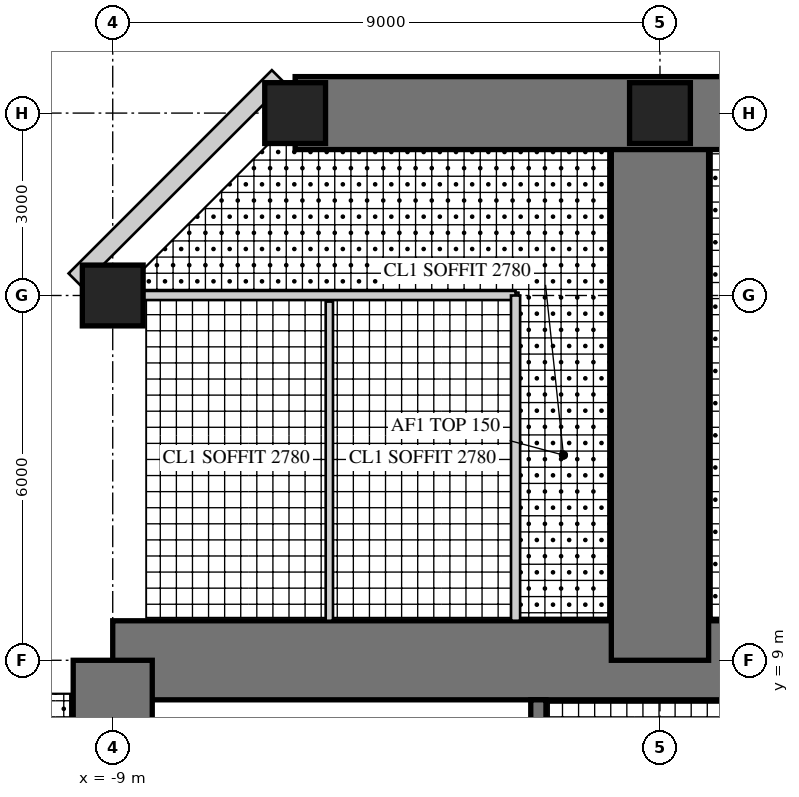
"""IFC4 building model, lengths in metres.
Left out: names, types, materials, properties, quantities, classifications, styles, units other than length and angle.
Written with IfcOpenShell. Run it as: python <this file> out.ifc"""

import sys

from ifc_helpers import new_model, si_unit, direction, frame, frame_2d, origin, origin_2d, place, context, subcontext, project, spatial, rectangle, hollow_rectangle, extrude, element, fill, save


model = new_model("IFC4")
c1 = context("Model", 3, precision=1e-05, world=origin(), true_north=direction((0.0, 1.0)))
c2 = subcontext(c1, "Body", "Model", "MODEL_VIEW")
j1 = project(units=[si_unit("LENGTHUNIT", "METRE"), si_unit("PLANEANGLEUNIT", "RADIAN")], contexts=[c1])
p1 = place(None, origin())
s1 = spatial("IfcSite", under=j1, at=p1, CompositionType="ELEMENT")
p2 = place(p1, origin())
s2 = spatial("IfcBuilding", under=s1, at=p2, CompositionType="ELEMENT")
p3 = place(p2, frame((0.0, 0.0, 116.5)))
s3 = spatial("IfcBuildingStorey", under=s2, at=p3, CompositionType="ELEMENT", Elevation=116.5)
p4 = place(p3, frame((9.0, 9.0, 0.0), z_axis=(0.0, 0.0, 1.0), x_axis=(-1.0, 0.0, 0.0)))
e1 = element("IfcWall", 1, at=p4, inside=s3, PredefinedType="SHEAR", context=c2, shape_type="SweptSolid", body=[
    extrude(rectangle(XDim=18.0, YDim=1.3, at=frame_2d((9.0, 0.0))), origin(), (0.0, 0.0, 1.0), 4.0),
])
p5 = place(p4, frame((9.8, 0.0, 0.0)))
e2 = element("IfcOpeningElement", 2, at=p5, cuts=e1, PredefinedType="OPENING", context=c2, shape_type="SweptSolid", body=[
    extrude(rectangle(XDim=1.0, YDim=2.4, at=frame_2d((0.5, 1.2))), frame((0.0, 0.66, 0.0), z_axis=(0.0, -1.0, 0.0), x_axis=(1.0, 0.0, 0.0)), (0.0, 0.0, 1.0), 1.32),
])
p6 = place(p3, frame((-9.0, 9.0, 0.0), z_axis=(0.0, 0.0, 1.0), x_axis=(0.0, -1.0, 0.0)))
e3 = element("IfcWall", 3, at=p6, inside=s3, PredefinedType="SHEAR", context=c2, shape_type="SweptSolid", body=[
    extrude(rectangle(XDim=18.0, YDim=1.3, at=frame_2d((9.0, 0.0))), origin(), (0.0, 0.0, 1.0), 4.0),
])
p7 = place(p6, frame((9.8, 0.0, 0.0)))
e4 = element("IfcOpeningElement", 4, at=p7, cuts=e3, PredefinedType="OPENING", context=c2, shape_type="SweptSolid", body=[
    extrude(rectangle(XDim=1.0, YDim=2.4, at=frame_2d((0.5, 1.2))), frame((0.0, 0.66, 0.0), z_axis=(0.0, -1.0, 0.0), x_axis=(1.0, 0.0, 0.0)), (0.0, 0.0, 1.0), 1.32),
])
p8 = place(p3, frame((-2.0, 1.675, 0.0), z_axis=(0.0, 0.0, 1.0), x_axis=(0.0, 1.0, 0.0)))
e5 = element("IfcWall", 5, at=p8, inside=s3, PredefinedType="SHEAR", context=c2, shape_type="SweptSolid", body=[
    extrude(rectangle(XDim=6.675, YDim=0.25, at=frame_2d((3.337, 0.0))), origin(), (0.0, 0.0, 1.0), 4.0),
])
p9 = place(p8, frame((0.725, 0.0, 0.0)))
e6 = element("IfcOpeningElement", 6, at=p9, cuts=e5, PredefinedType="OPENING", context=c2, shape_type="SweptSolid", body=[
    extrude(rectangle(XDim=1.0, YDim=2.1, at=frame_2d((0.5, 1.05))), frame((0.0, 0.135, 0.0), z_axis=(0.0, -1.0, 0.0), x_axis=(1.0, 0.0, 0.0)), (0.0, 0.0, 1.0), 0.27),
])
p10 = place(p3, frame((0.0, 9.0, 0.0), z_axis=(0.0, 0.0, 1.0), x_axis=(0.0, 1.0, 0.0)))
e7 = element("IfcWall", 7, at=p10, inside=s3, PredefinedType="SHEAR", context=c2, shape_type="SweptSolid", body=[
    extrude(rectangle(XDim=9.0, YDim=1.6, at=frame_2d((4.5, 0.0))), origin(), (0.0, 0.0, 1.0), 4.0),
])
p11 = place(p10, frame((4.3, 0.0, 0.0)))
e8 = element("IfcOpeningElement", 8, at=p11, cuts=e7, PredefinedType="OPENING", context=c2, shape_type="SweptSolid", body=[
    extrude(rectangle(XDim=1.0, YDim=2.2, at=frame_2d((0.5, 1.1))), frame((0.0, 0.81, 0.0), z_axis=(0.0, -1.0, 0.0), x_axis=(1.0, 0.0, 0.0)), (0.0, 0.0, 1.0), 1.62),
])
p12 = place(p3, frame((6.0, 18.0, 0.0), z_axis=(0.0, 0.0, 1.0), x_axis=(-1.0, 0.0, 0.0)))
e9 = element("IfcWall", 9, at=p12, inside=s3, PredefinedType="SHEAR", context=c2, shape_type="SweptSolid", body=[
    extrude(rectangle(XDim=12.0, YDim=1.2, at=frame_2d((6.0, 0.0))), origin(), (0.0, 0.0, 1.0), 4.0),
])
p13 = place(p12, frame((1.45, 0.0, 0.6)))
e10 = element("IfcOpeningElement", 10, at=p13, cuts=e9, PredefinedType="OPENING", context=c2, shape_type="SweptSolid", body=[
    extrude(rectangle(XDim=3.0, YDim=2.4, at=frame_2d((1.5, 1.2))), frame((0.0, 0.61, 0.0), z_axis=(0.0, -1.0, 0.0), x_axis=(1.0, 0.0, 0.0)), (0.0, 0.0, 1.0), 1.22),
])
p14 = place(p12, frame((7.55, 0.0, 0.6)))
e11 = element("IfcOpeningElement", 11, at=p14, cuts=e9, PredefinedType="OPENING", context=c2, shape_type="SweptSolid", body=[
    extrude(rectangle(XDim=3.0, YDim=2.4, at=frame_2d((1.5, 1.2))), frame((0.0, 0.61, 0.0), z_axis=(0.0, -1.0, 0.0), x_axis=(1.0, 0.0, 0.0)), (0.0, 0.0, 1.0), 1.22),
])
for number, where, z_axis, x_axis in (
    (12, (-9.0, 15.0, 0.0), (0.0, 0.0, 1.0), (1.0, 0.0, 0.0)),
    (13, (0.0, 18.0, 0.0), (0.0, 0.0, 1.0), (1.0, 0.0, 0.0)),
    (14, (-6.0, 18.0, 0.0), (0.0, 0.0, 1.0), (1.0, 0.0, 0.0)),
):
    element("IfcColumn", number, at=place(p3, frame(where, z_axis=z_axis, x_axis=x_axis)), inside=s3, PredefinedType="COLUMN", context=c2, shape_type="SweptSolid", body=[
        extrude(rectangle(XDim=1.0, YDim=1.0, at=origin_2d()), origin(), (0.0, 0.0, 1.0), 4.0),
    ])
p15 = place(p3, frame((-6.277, 18.6, 0.0), z_axis=(0.0, 0.0, 1.0), x_axis=(-0.707106781187, -0.707106781187, 0.0)))
e15 = element("IfcWall", 15, at=p15, inside=s3, PredefinedType="SOLIDWALL", context=c2, shape_type="SweptSolid", body=[
    extrude(rectangle(XDim=4.728, YDim=0.3, at=frame_2d((2.364, 0.0))), origin(), (0.0, 0.0, 1.0), 3.8),
])
p16 = place(p15, frame((1.914, 0.0, 0.3)))
e16 = element("IfcOpeningElement", 16, at=p16, cuts=e15, PredefinedType="OPENING", context=c2, shape_type="SweptSolid", body=[
    extrude(rectangle(XDim=0.9, YDim=2.4, at=frame_2d((0.45, 1.2))), frame((0.0, 0.16, 0.0), z_axis=(0.0, -1.0, 0.0), x_axis=(1.0, 0.0, 0.0)), (0.0, 0.0, 1.0), 0.32),
])
p17 = place(p3, frame((-2.375, 15.0, 0.0), z_axis=(0.0, 0.0, 1.0), x_axis=(-1.0, 0.0, 0.0)))
e17 = element("IfcWall", 17, at=p17, inside=s3, PredefinedType="PARTITIONING", context=c2, shape_type="SweptSolid", body=[
    extrude(rectangle(XDim=6.125, YDim=0.15, at=frame_2d((3.062, 0.0))), origin(), (0.0, 0.0, 1.0), 3.0),
])
p18 = place(p17, frame((1.031, 0.0, 0.0)))
e18 = element("IfcOpeningElement", 18, at=p18, cuts=e17, PredefinedType="OPENING", context=c2, shape_type="SweptSolid", body=[
    extrude(rectangle(XDim=1.0, YDim=2.1, at=frame_2d((0.5, 1.05))), frame((0.0, 0.085, 0.0), z_axis=(0.0, -1.0, 0.0), x_axis=(1.0, 0.0, 0.0)), (0.0, 0.0, 1.0), 0.17),
])
p19 = place(p17, frame((4.094, 0.0, 0.0)))
e19 = element("IfcOpeningElement", 19, at=p19, cuts=e17, PredefinedType="OPENING", context=c2, shape_type="SweptSolid", body=[
    extrude(rectangle(XDim=1.0, YDim=2.1, at=frame_2d((0.5, 1.05))), frame((0.0, 0.085, 0.0), z_axis=(0.0, -1.0, 0.0), x_axis=(1.0, 0.0, 0.0)), (0.0, 0.0, 1.0), 0.17),
])
p20 = place(p3, frame((-2.375, 9.65, 0.0), z_axis=(0.0, 0.0, 1.0), x_axis=(0.0, 1.0, 0.0)))
e20 = element("IfcWall", 20, at=p20, inside=s3, PredefinedType="PARTITIONING", context=c2, shape_type="SweptSolid", body=[
    extrude(rectangle(XDim=5.35, YDim=0.15, at=frame_2d((2.675, 0.0))), origin(), (0.0, 0.0, 1.0), 3.8),
])
p21 = place(p3, frame((-5.438, 9.65, 0.0), z_axis=(0.0, 0.0, 1.0), x_axis=(0.0, 1.0, 0.0)))
e21 = element("IfcWall", 21, at=p21, inside=s3, PredefinedType="PLUMBINGWALL", context=c2, shape_type="SweptSolid", body=[
    extrude(rectangle(XDim=5.25, YDim=0.12, at=frame_2d((2.625, 0.0))), origin(), (0.0, 0.0, 1.0), 3.8),
])
p22 = place(p14, origin())
e22 = element("IfcWindow", 22, at=p22, inside=s3, PartitioningType="SINGLE_PANEL", PredefinedType="WINDOW", context=c2, shape_type="SweptSolid", body=[
    extrude(hollow_rectangle(XDim=3.0, YDim=2.4, WallThickness=0.06, at=frame_2d((1.5, 1.2))), frame((0.0, 0.03, 0.0), z_axis=(0.0, -1.0, 0.0), x_axis=(1.0, 0.0, 0.0)), (0.0, 0.0, 1.0), 0.06),
    extrude(rectangle(XDim=2.879, YDim=2.279, at=frame_2d((1.5, 1.2))), frame((0.0, 0.03, 0.0), z_axis=(0.0, -1.0, 0.0), x_axis=(1.0, 0.0, 0.0)), (0.0, 0.0, 1.0), 0.06),
])
fill(e11, e22)
p23 = place(p16, origin())
e23 = element("IfcWindow", 23, at=p23, inside=s3, PartitioningType="SINGLE_PANEL", PredefinedType="WINDOW", context=c2, shape_type="SweptSolid", body=[
    extrude(hollow_rectangle(XDim=0.9, YDim=2.4, WallThickness=0.06, at=frame_2d((0.45, 1.2))), frame((0.0, 0.03, 0.0), z_axis=(0.0, -1.0, 0.0), x_axis=(1.0, 0.0, 0.0)), (0.0, 0.0, 1.0), 0.06),
    extrude(rectangle(XDim=0.779, YDim=2.279, at=frame_2d((0.45, 1.2))), frame((0.0, 0.03, 0.0), z_axis=(0.0, -1.0, 0.0), x_axis=(1.0, 0.0, 0.0)), (0.0, 0.0, 1.0), 0.06),
])
fill(e16, e23)
p24 = place(p18, origin())
e24 = element("IfcDoor", 24, at=p24, inside=s3, OperationType="SINGLE_SWING_LEFT", PredefinedType="DOOR", context=c2, shape_type="SweptSolid", body=[
    extrude(rectangle(XDim=1.0, YDim=2.1, at=frame_2d((0.5, 1.05))), frame((0.0, 0.025, 0.0), z_axis=(0.0, -1.0, 0.0), x_axis=(1.0, 0.0, 0.0)), (0.0, 0.0, 1.0), 0.05),
])
fill(e18, e24)
p25 = place(p19, origin())
e25 = element("IfcDoor", 25, at=p25, inside=s3, OperationType="SINGLE_SWING_LEFT", PredefinedType="DOOR", context=c2, shape_type="SweptSolid", body=[
    extrude(rectangle(XDim=1.0, YDim=2.1, at=frame_2d((0.5, 1.05))), frame((0.0, 0.025, 0.0), z_axis=(0.0, -1.0, 0.0), x_axis=(1.0, 0.0, 0.0)), (0.0, 0.0, 1.0), 0.05),
])
fill(e19, e25)
p26 = place(p11, origin())
e26 = element("IfcDoor", 26, at=p26, inside=s3, OperationType="SINGLE_SWING_RIGHT", PredefinedType="DOOR", context=c2, shape_type="SweptSolid", body=[
    extrude(rectangle(XDim=1.0, YDim=2.2, at=frame_2d((0.5, 1.1))), frame((0.0, 0.025, 0.0), z_axis=(0.0, -1.0, 0.0), x_axis=(1.0, 0.0, 0.0)), (0.0, 0.0, 1.0), 0.05),
])
fill(e8, e26)
p27 = place(p5, frame((1.0, 0.0, 0.0), z_axis=(0.0, 0.0, 1.0), x_axis=(-1.0, 0.0, 0.0)))
e27 = element("IfcDoor", 27, at=p27, inside=s3, OperationType="SINGLE_SWING_RIGHT", PredefinedType="DOOR", context=c2, shape_type="SweptSolid", body=[
    extrude(rectangle(XDim=1.0, YDim=2.4, at=frame_2d((0.5, 1.2))), frame((0.0, -0.005, 0.0), z_axis=(0.0, -1.0, 0.0), x_axis=(1.0, 0.0, 0.0)), (0.0, 0.0, 1.0), 0.05),
])
fill(e2, e27)
save(model, sys.argv[1])
